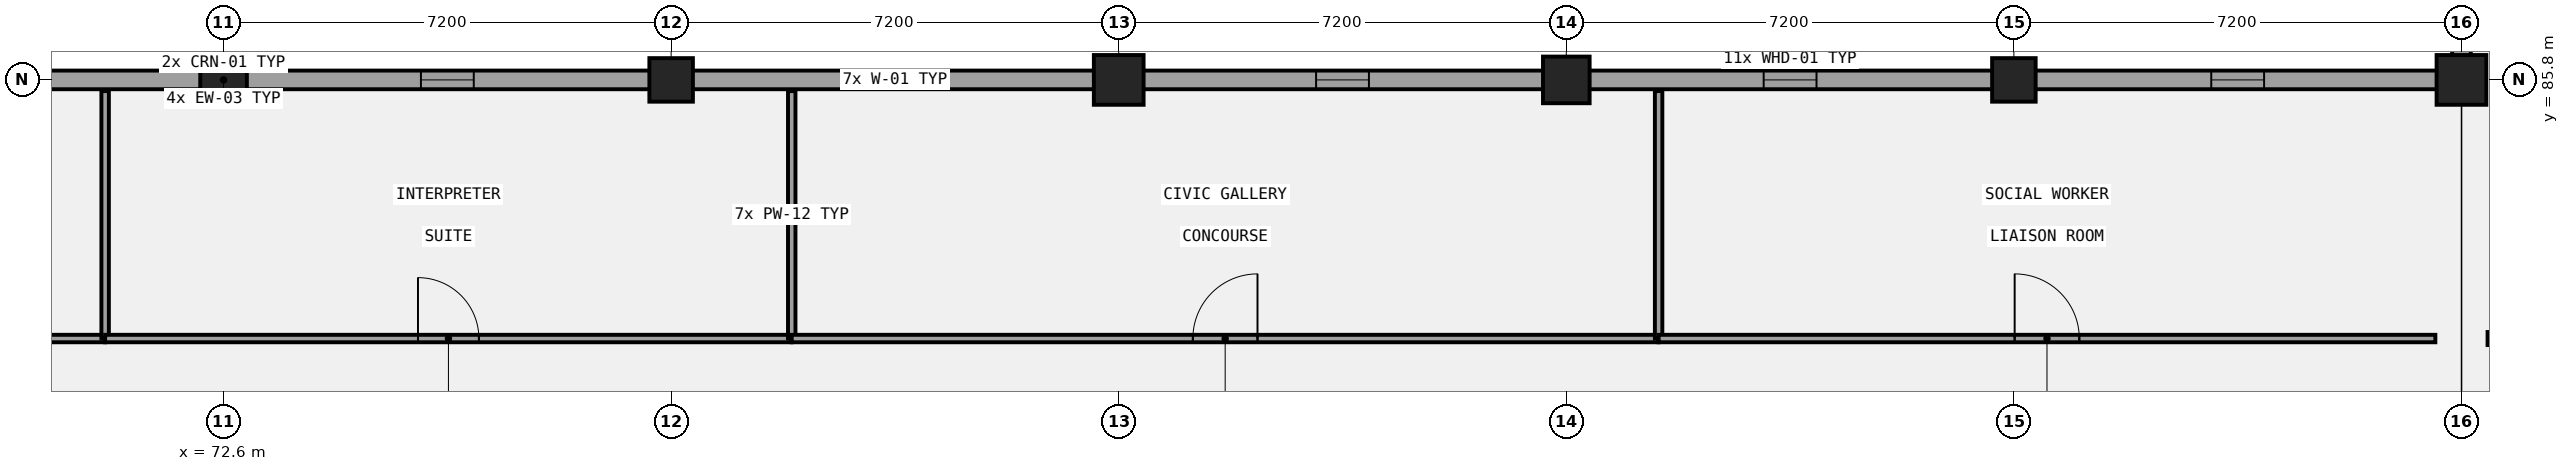
"""IFC4 building model, lengths in metres.
Left out: names, types, materials, properties, quantities, classifications, styles, units other than length and angle.
Written with IfcOpenShell. Run it as: python <this file> out.ifc"""

import sys

from ifc_helpers import new_model, si_unit, direction, frame, frame_2d, origin, origin_2d, place, context, subcontext, project, spatial, rectangle, extrude, element, fill, save


model = new_model("IFC4")
c1 = context("Model", 3, precision=1e-05, world=origin(), true_north=direction((0.0, 1.0)))
c2 = subcontext(c1, "Body", "Model", "MODEL_VIEW")
j1 = project(units=[si_unit("LENGTHUNIT", "METRE"), si_unit("PLANEANGLEUNIT", "RADIAN")], contexts=[c1])
p1 = place(None, origin())
s1 = spatial("IfcSite", under=j1, at=p1, CompositionType="ELEMENT")
p2 = place(p1, origin())
s2 = spatial("IfcBuilding", under=s1, at=p2, CompositionType="ELEMENT")
p3 = place(p2, frame((0.0, 0.0, 5.4)))
s3 = spatial("IfcBuildingStorey", under=s2, at=p3, CompositionType="ELEMENT", Elevation=5.4)
p4 = place(p3, frame((72.6, 85.8, 0.0), z_axis=(0.0, 0.0, 1.0), x_axis=(1.0, 0.0, 0.0)))
e1 = element("IfcColumn", 1, at=p4, inside=s3, PredefinedType="COLUMN", context=c2, shape_type="SweptSolid", body=[
    extrude(rectangle(XDim=0.75, YDim=0.75, at=origin_2d()), origin(), (0.0, 0.0, 1.0), 4.2),
])
p5 = place(p3, frame((79.8, 85.8, 0.0), z_axis=(0.0, 0.0, 1.0), x_axis=(1.0, 0.0, 0.0)))
e2 = element("IfcColumn", 2, at=p5, inside=s3, PredefinedType="COLUMN", context=c2, shape_type="SweptSolid", body=[
    extrude(rectangle(XDim=0.7, YDim=0.7, at=origin_2d()), origin(), (0.0, 0.0, 1.0), 4.2),
])
p6 = place(p3, frame((87.0, 85.8, 0.0), z_axis=(0.0, 0.0, 1.0), x_axis=(1.0, 0.0, 0.0)))
e3 = element("IfcColumn", 3, at=p6, inside=s3, PredefinedType="COLUMN", context=c2, shape_type="SweptSolid", body=[
    extrude(rectangle(XDim=0.8, YDim=0.8, at=origin_2d()), origin(), (0.0, 0.0, 1.0), 4.2),
])
p7 = place(p3, frame((94.2, 85.8, 0.0), z_axis=(0.0, 0.0, 1.0), x_axis=(1.0, 0.0, 0.0)))
e4 = element("IfcColumn", 4, at=p7, inside=s3, PredefinedType="COLUMN", context=c2, shape_type="SweptSolid", body=[
    extrude(rectangle(XDim=0.75, YDim=0.75, at=origin_2d()), origin(), (0.0, 0.0, 1.0), 4.2),
])
p8 = place(p3, frame((101.4, 85.8, 0.0), z_axis=(0.0, 0.0, 1.0), x_axis=(1.0, 0.0, 0.0)))
e5 = element("IfcColumn", 5, at=p8, inside=s3, PredefinedType="COLUMN", context=c2, shape_type="SweptSolid", body=[
    extrude(rectangle(XDim=0.7, YDim=0.7, at=origin_2d()), origin(), (0.0, 0.0, 1.0), 4.2),
])
p9 = place(p3, frame((108.6, 85.8, 0.0), z_axis=(0.0, 0.0, 1.0), x_axis=(1.0, 0.0, 0.0)))
e6 = element("IfcColumn", 6, at=p9, inside=s3, PredefinedType="COLUMN", context=c2, shape_type="SweptSolid", body=[
    extrude(rectangle(XDim=0.8, YDim=0.8, at=origin_2d()), origin(), (0.0, 0.0, 1.0), 4.2),
])
p10 = place(p3, frame((108.6, 92.75, 0.0), z_axis=(0.0, 0.0, 1.0), x_axis=(0.0, -1.0, 0.0)))
e7 = element("IfcWall", 7, at=p10, inside=s3, PredefinedType="SOLIDWALL", context=c2, shape_type="SweptSolid", body=[
    extrude(rectangle(XDim=6.8, YDim=0.3, at=frame_2d((3.4, 0.0))), origin(), (0.0, 0.0, 1.0), 3.07),
])
p11 = place(p10, frame((2.825, 0.0, 0.95)))
e8 = element("IfcOpeningElement", 8, at=p11, cuts=e7, PredefinedType="OPENING", context=c2, shape_type="SweptSolid", body=[
    extrude(rectangle(XDim=1.15, YDim=1.65, at=frame_2d((0.575, 0.825))), frame((0.0, 0.16, 0.0), z_axis=(0.0, -1.0, 0.0), x_axis=(1.0, 0.0, 0.0)), (0.0, 0.0, 1.0), 0.32),
])
p12 = place(p3, frame((108.75, 85.8, 0.0), z_axis=(0.0, 0.0, 1.0), x_axis=(-1.0, 0.0, 0.0)))
e9 = element("IfcWall", 9, at=p12, inside=s3, PredefinedType="SOLIDWALL", context=c2, shape_type="SweptSolid", body=[
    extrude(rectangle(XDim=72.3, YDim=0.3, at=frame_2d((36.15, 0.0))), origin(), (0.0, 0.0, 1.0), 2.92),
])
p13 = place(p12, frame((68.125, 0.0, 1.0)))
e10 = element("IfcOpeningElement", 10, at=p13, cuts=e9, PredefinedType="OPENING", context=c2, shape_type="SweptSolid", body=[
    extrude(rectangle(XDim=0.85, YDim=1.4, at=frame_2d((0.425, 0.7))), frame((0.0, 0.16, 0.0), z_axis=(0.0, -1.0, 0.0), x_axis=(1.0, 0.0, 0.0)), (0.0, 0.0, 1.0), 0.32),
])
p14 = place(p12, frame((60.925, 0.0, 1.0)))
e11 = element("IfcOpeningElement", 11, at=p14, cuts=e9, PredefinedType="OPENING", context=c2, shape_type="SweptSolid", body=[
    extrude(rectangle(XDim=0.85, YDim=1.4, at=frame_2d((0.425, 0.7))), frame((0.0, 0.16, 0.0), z_axis=(0.0, -1.0, 0.0), x_axis=(1.0, 0.0, 0.0)), (0.0, 0.0, 1.0), 0.32),
])
p15 = place(p12, frame((53.725, 0.0, 1.0)))
e12 = element("IfcOpeningElement", 12, at=p15, cuts=e9, PredefinedType="OPENING", context=c2, shape_type="SweptSolid", body=[
    extrude(rectangle(XDim=0.85, YDim=1.4, at=frame_2d((0.425, 0.7))), frame((0.0, 0.16, 0.0), z_axis=(0.0, -1.0, 0.0), x_axis=(1.0, 0.0, 0.0)), (0.0, 0.0, 1.0), 0.32),
])
p16 = place(p12, frame((46.525, 0.0, 1.0)))
e13 = element("IfcOpeningElement", 13, at=p16, cuts=e9, PredefinedType="OPENING", context=c2, shape_type="SweptSolid", body=[
    extrude(rectangle(XDim=0.85, YDim=1.4, at=frame_2d((0.425, 0.7))), frame((0.0, 0.16, 0.0), z_axis=(0.0, -1.0, 0.0), x_axis=(1.0, 0.0, 0.0)), (0.0, 0.0, 1.0), 0.32),
])
p17 = place(p12, frame((39.325, 0.0, 1.0)))
e14 = element("IfcOpeningElement", 14, at=p17, cuts=e9, PredefinedType="OPENING", context=c2, shape_type="SweptSolid", body=[
    extrude(rectangle(XDim=0.85, YDim=1.4, at=frame_2d((0.425, 0.7))), frame((0.0, 0.16, 0.0), z_axis=(0.0, -1.0, 0.0), x_axis=(1.0, 0.0, 0.0)), (0.0, 0.0, 1.0), 0.32),
])
p18 = place(p12, frame((32.125, 0.0, 1.0)))
e15 = element("IfcOpeningElement", 15, at=p18, cuts=e9, PredefinedType="OPENING", context=c2, shape_type="SweptSolid", body=[
    extrude(rectangle(XDim=0.85, YDim=1.4, at=frame_2d((0.425, 0.7))), frame((0.0, 0.16, 0.0), z_axis=(0.0, -1.0, 0.0), x_axis=(1.0, 0.0, 0.0)), (0.0, 0.0, 1.0), 0.32),
])
p19 = place(p12, frame((24.925, 0.0, 1.0)))
e16 = element("IfcOpeningElement", 16, at=p19, cuts=e9, PredefinedType="OPENING", context=c2, shape_type="SweptSolid", body=[
    extrude(rectangle(XDim=0.85, YDim=1.4, at=frame_2d((0.425, 0.7))), frame((0.0, 0.16, 0.0), z_axis=(0.0, -1.0, 0.0), x_axis=(1.0, 0.0, 0.0)), (0.0, 0.0, 1.0), 0.32),
])
p20 = place(p12, frame((17.725, 0.0, 1.0)))
e17 = element("IfcOpeningElement", 17, at=p20, cuts=e9, PredefinedType="OPENING", context=c2, shape_type="SweptSolid", body=[
    extrude(rectangle(XDim=0.85, YDim=1.4, at=frame_2d((0.425, 0.7))), frame((0.0, 0.16, 0.0), z_axis=(0.0, -1.0, 0.0), x_axis=(1.0, 0.0, 0.0)), (0.0, 0.0, 1.0), 0.32),
])
p21 = place(p12, frame((10.525, 0.0, 1.0)))
e18 = element("IfcOpeningElement", 18, at=p21, cuts=e9, PredefinedType="OPENING", context=c2, shape_type="SweptSolid", body=[
    extrude(rectangle(XDim=0.85, YDim=1.4, at=frame_2d((0.425, 0.7))), frame((0.0, 0.16, 0.0), z_axis=(0.0, -1.0, 0.0), x_axis=(1.0, 0.0, 0.0)), (0.0, 0.0, 1.0), 0.32),
])
p22 = place(p12, frame((3.325, 0.0, 1.0)))
e19 = element("IfcOpeningElement", 19, at=p22, cuts=e9, PredefinedType="OPENING", context=c2, shape_type="SweptSolid", body=[
    extrude(rectangle(XDim=0.85, YDim=1.4, at=frame_2d((0.425, 0.7))), frame((0.0, 0.16, 0.0), z_axis=(0.0, -1.0, 0.0), x_axis=(1.0, 0.0, 0.0)), (0.0, 0.0, 1.0), 0.32),
])
p23 = place(p3, frame((109.02, 81.64, 0.0), z_axis=(0.0, 0.0, 1.0), x_axis=(1.0, 0.0, 0.0)))
e20 = element("IfcWall", 20, at=p23, inside=s3, PredefinedType="PARTITIONING", context=c2, shape_type="SweptSolid", body=[
    extrude(rectangle(XDim=7.032, YDim=0.21, at=frame_2d((3.516, 0.0))), origin(), (0.0, 0.0, 1.0), 3.92),
])
p24 = place(p23, frame((3.026, 0.0, 0.0)))
e21 = element("IfcOpeningElement", 21, at=p24, cuts=e20, PredefinedType="OPENING", context=c2, shape_type="SweptSolid", body=[
    extrude(rectangle(XDim=0.98, YDim=2.1, at=frame_2d((0.49, 1.05))), frame((0.0, 0.115, 0.0), z_axis=(0.0, -1.0, 0.0), x_axis=(1.0, 0.0, 0.0)), (0.0, 0.0, 1.0), 0.23),
])
p25 = place(p3, frame((58.2, 81.64, 0.0), z_axis=(0.0, 0.0, 1.0), x_axis=(1.0, 0.0, 0.0)))
e22 = element("IfcWall", 22, at=p25, inside=s3, PredefinedType="PARTITIONING", context=c2, shape_type="SweptSolid", body=[
    extrude(rectangle(XDim=12.495, YDim=0.12, at=frame_2d((6.248, 0.0))), origin(), (0.0, 0.0, 1.0), 3.92),
])
p26 = place(p25, frame((5.758, 0.0, 0.0)))
e23 = element("IfcOpeningElement", 23, at=p26, cuts=e22, PredefinedType="OPENING", context=c2, shape_type="SweptSolid", body=[
    extrude(rectangle(XDim=0.98, YDim=2.22, at=frame_2d((0.49, 1.11))), frame((0.0, 0.07, 0.0), z_axis=(0.0, -1.0, 0.0), x_axis=(1.0, 0.0, 0.0)), (0.0, 0.0, 1.0), 0.14),
])
p27 = place(p3, frame((70.695, 81.64, 0.0), z_axis=(0.0, 0.0, 1.0), x_axis=(0.0, 1.0, 0.0)))
e24 = element("IfcWall", 24, at=p27, inside=s3, PredefinedType="PARTITIONING", context=c2, shape_type="SweptSolid", body=[
    extrude(rectangle(XDim=3.98, YDim=0.12, at=frame_2d((1.99, 0.0))), origin(), (0.0, 0.0, 1.0), 3.92),
])
p28 = place(p3, frame((70.695, 81.64, 0.0), z_axis=(0.0, 0.0, 1.0), x_axis=(1.0, 0.0, 0.0)))
e25 = element("IfcWall", 25, at=p28, inside=s3, PredefinedType="PARTITIONING", context=c2, shape_type="SweptSolid", body=[
    extrude(rectangle(XDim=11.045, YDim=0.12, at=frame_2d((5.522, 0.0))), origin(), (0.0, 0.0, 1.0), 3.92),
])
p29 = place(p28, frame((5.032, 0.0, 0.0)))
e26 = element("IfcOpeningElement", 26, at=p29, cuts=e25, PredefinedType="OPENING", context=c2, shape_type="SweptSolid", body=[
    extrude(rectangle(XDim=0.98, YDim=2.35, at=frame_2d((0.49, 1.175))), frame((0.0, 0.07, 0.0), z_axis=(0.0, -1.0, 0.0), x_axis=(1.0, 0.0, 0.0)), (0.0, 0.0, 1.0), 0.14),
])
p30 = place(p3, frame((81.74, 81.64, 0.0), z_axis=(0.0, 0.0, 1.0), x_axis=(0.0, 1.0, 0.0)))
e27 = element("IfcWall", 27, at=p30, inside=s3, PredefinedType="PARTITIONING", context=c2, shape_type="SweptSolid", body=[
    extrude(rectangle(XDim=3.98, YDim=0.12, at=frame_2d((1.99, 0.0))), origin(), (0.0, 0.0, 1.0), 3.92),
])
p31 = place(p3, frame((81.74, 81.64, 0.0), z_axis=(0.0, 0.0, 1.0), x_axis=(1.0, 0.0, 0.0)))
e28 = element("IfcWall", 28, at=p31, inside=s3, PredefinedType="PARTITIONING", context=c2, shape_type="SweptSolid", body=[
    extrude(rectangle(XDim=13.945, YDim=0.12, at=frame_2d((6.973, 0.0))), origin(), (0.0, 0.0, 1.0), 3.92),
])
p32 = place(p31, frame((6.452, 0.0, 0.0)))
e29 = element("IfcOpeningElement", 29, at=p32, cuts=e28, PredefinedType="OPENING", context=c2, shape_type="SweptSolid", body=[
    extrude(rectangle(XDim=1.04, YDim=2.1, at=frame_2d((0.52, 1.05))), frame((0.0, 0.07, 0.0), z_axis=(0.0, -1.0, 0.0), x_axis=(1.0, 0.0, 0.0)), (0.0, 0.0, 1.0), 0.14),
])
p33 = place(p3, frame((95.685, 81.64, 0.0), z_axis=(0.0, 0.0, 1.0), x_axis=(0.0, 1.0, 0.0)))
e30 = element("IfcWall", 30, at=p33, inside=s3, PredefinedType="PARTITIONING", context=c2, shape_type="SweptSolid", body=[
    extrude(rectangle(XDim=3.98, YDim=0.12, at=frame_2d((1.99, 0.0))), origin(), (0.0, 0.0, 1.0), 3.92),
])
p34 = place(p3, frame((95.685, 81.64, 0.0), z_axis=(0.0, 0.0, 1.0), x_axis=(1.0, 0.0, 0.0)))
e31 = element("IfcWall", 31, at=p34, inside=s3, PredefinedType="PARTITIONING", context=c2, shape_type="SweptSolid", body=[
    extrude(rectangle(XDim=12.495, YDim=0.12, at=frame_2d((6.248, 0.0))), origin(), (0.0, 0.0, 1.0), 3.92),
])
p35 = place(p34, frame((5.728, 0.0, 0.0)))
e32 = element("IfcOpeningElement", 32, at=p35, cuts=e31, PredefinedType="OPENING", context=c2, shape_type="SweptSolid", body=[
    extrude(rectangle(XDim=1.04, YDim=2.22, at=frame_2d((0.52, 1.11))), frame((0.0, 0.07, 0.0), z_axis=(0.0, -1.0, 0.0), x_axis=(1.0, 0.0, 0.0)), (0.0, 0.0, 1.0), 0.14),
])
p36 = place(p18, origin())
e33 = element("IfcWindow", 33, at=p36, inside=s3, PartitioningType="SINGLE_PANEL", PredefinedType="WINDOW", context=c2, shape_type="SweptSolid", body=[
    extrude(rectangle(XDim=0.85, YDim=1.4, at=frame_2d((0.425, 0.7))), frame((0.0, 0.03, 0.0), z_axis=(0.0, -1.0, 0.0), x_axis=(1.0, 0.0, 0.0)), (0.0, 0.0, 1.0), 0.06),
])
fill(e15, e33)
p37 = place(p19, origin())
e34 = element("IfcWindow", 34, at=p37, inside=s3, PartitioningType="SINGLE_PANEL", PredefinedType="WINDOW", context=c2, shape_type="SweptSolid", body=[
    extrude(rectangle(XDim=0.85, YDim=1.4, at=frame_2d((0.425, 0.7))), frame((0.0, 0.03, 0.0), z_axis=(0.0, -1.0, 0.0), x_axis=(1.0, 0.0, 0.0)), (0.0, 0.0, 1.0), 0.06),
])
fill(e16, e34)
p38 = place(p20, origin())
e35 = element("IfcWindow", 35, at=p38, inside=s3, PartitioningType="SINGLE_PANEL", PredefinedType="WINDOW", context=c2, shape_type="SweptSolid", body=[
    extrude(rectangle(XDim=0.85, YDim=1.4, at=frame_2d((0.425, 0.7))), frame((0.0, 0.03, 0.0), z_axis=(0.0, -1.0, 0.0), x_axis=(1.0, 0.0, 0.0)), (0.0, 0.0, 1.0), 0.06),
])
fill(e17, e35)
p39 = place(p21, origin())
e36 = element("IfcWindow", 36, at=p39, inside=s3, PartitioningType="SINGLE_PANEL", PredefinedType="WINDOW", context=c2, shape_type="SweptSolid", body=[
    extrude(rectangle(XDim=0.85, YDim=1.4, at=frame_2d((0.425, 0.7))), frame((0.0, 0.03, 0.0), z_axis=(0.0, -1.0, 0.0), x_axis=(1.0, 0.0, 0.0)), (0.0, 0.0, 1.0), 0.06),
])
fill(e18, e36)
p40 = place(p22, origin())
e37 = element("IfcWindow", 37, at=p40, inside=s3, PartitioningType="SINGLE_PANEL", PredefinedType="WINDOW", context=c2, shape_type="SweptSolid", body=[
    extrude(rectangle(XDim=0.85, YDim=1.4, at=frame_2d((0.425, 0.7))), frame((0.0, 0.03, 0.0), z_axis=(0.0, -1.0, 0.0), x_axis=(1.0, 0.0, 0.0)), (0.0, 0.0, 1.0), 0.06),
])
fill(e19, e37)
p41 = place(p29, origin())
e38 = element("IfcDoor", 38, at=p41, inside=s3, OperationType="SINGLE_SWING_LEFT", PredefinedType="DOOR", context=c2, shape_type="SweptSolid", body=[
    extrude(rectangle(XDim=0.98, YDim=2.35, at=frame_2d((0.49, 1.175))), frame((0.0, 0.025, 0.0), z_axis=(0.0, -1.0, 0.0), x_axis=(1.0, 0.0, 0.0)), (0.0, 0.0, 1.0), 0.05),
])
fill(e26, e38)
p42 = place(p32, origin())
e39 = element("IfcDoor", 39, at=p42, inside=s3, OperationType="SINGLE_SWING_RIGHT", PredefinedType="DOOR", context=c2, shape_type="SweptSolid", body=[
    extrude(rectangle(XDim=1.04, YDim=2.1, at=frame_2d((0.52, 1.05))), frame((0.0, 0.025, 0.0), z_axis=(0.0, -1.0, 0.0), x_axis=(1.0, 0.0, 0.0)), (0.0, 0.0, 1.0), 0.05),
])
fill(e29, e39)
p43 = place(p35, origin())
e40 = element("IfcDoor", 40, at=p43, inside=s3, OperationType="SINGLE_SWING_LEFT", PredefinedType="DOOR", context=c2, shape_type="SweptSolid", body=[
    extrude(rectangle(XDim=1.04, YDim=2.22, at=frame_2d((0.52, 1.11))), frame((0.0, 0.025, 0.0), z_axis=(0.0, -1.0, 0.0), x_axis=(1.0, 0.0, 0.0)), (0.0, 0.0, 1.0), 0.05),
])
fill(e32, e40)
save(model, sys.argv[1])
